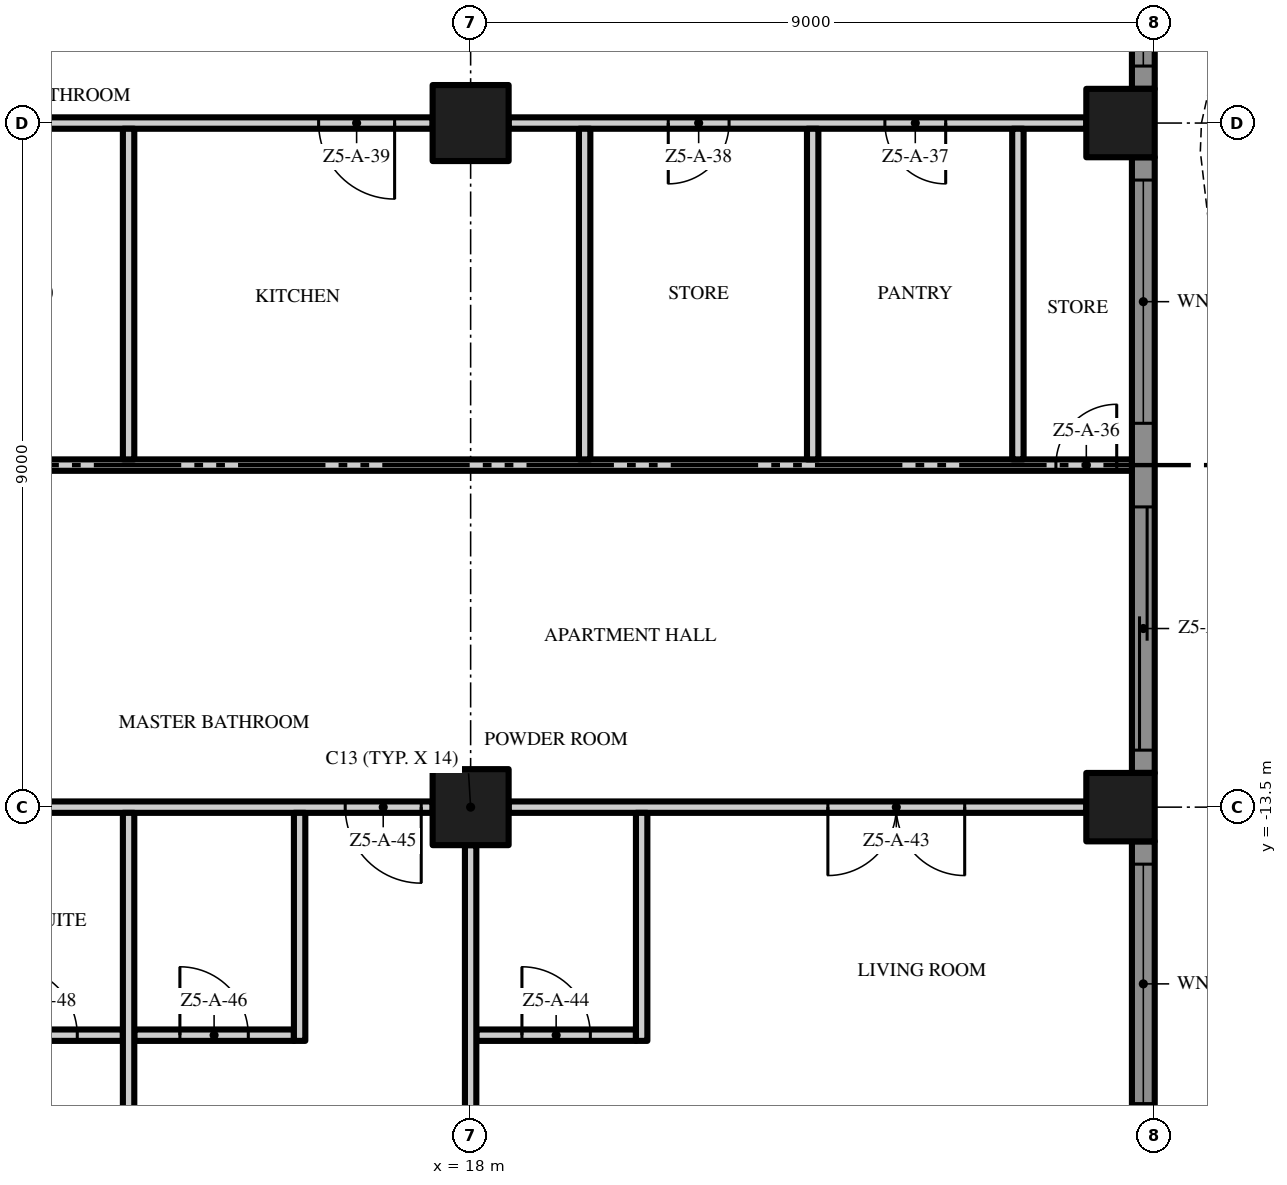
"""IFC4 building model, lengths in metres.
Left out: names, types, materials, properties, quantities, classifications, styles, units other than length and angle.
Written with IfcOpenShell. Run it as: python <this file> out.ifc"""

import sys

from ifc_helpers import new_model, si_unit, direction, frame, frame_2d, origin, origin_2d, place, context, subcontext, project, spatial, polyline, rectangle, outline, extrude, element, fill, save


model = new_model("IFC4")
c1 = context("Model", 3, precision=1e-05, world=origin(), true_north=direction((0.0, 1.0)))
c2 = subcontext(c1, "Body", "Model", "MODEL_VIEW")
j1 = project(units=[si_unit("LENGTHUNIT", "METRE"), si_unit("PLANEANGLEUNIT", "RADIAN")], contexts=[c1])
p1 = place(None, origin())
s1 = spatial("IfcSite", under=j1, at=p1, CompositionType="ELEMENT")
p2 = place(p1, origin())
s2 = spatial("IfcBuilding", under=s1, at=p2, CompositionType="ELEMENT")
p3 = place(p2, frame((0.0, 0.0, 238.8)))
s3 = spatial("IfcBuildingStorey", under=s2, at=p3, CompositionType="ELEMENT", Elevation=238.8)
for number, where, z_axis, x_axis in (
    (1, (18.0, -13.5, 0.0), (0.0, 0.0, 1.0), (1.0, 0.0, 0.0)),
    (2, (18.0, -4.5, 0.0), (0.0, 0.0, 1.0), (1.0, 0.0, 0.0)),
):
    element("IfcColumn", number, at=place(p3, frame(where, z_axis=z_axis, x_axis=x_axis)), inside=s3, PredefinedType="COLUMN", context=c2, shape_type="SweptSolid", body=[
        extrude(rectangle(XDim=1.0, YDim=1.0, at=origin_2d()), origin(), (0.0, 0.0, 1.0), 3.5),
    ])
for number, where, z_axis, x_axis in (
    (3, (26.55, -13.5, 0.0), (0.0, 0.0, 1.0), (1.0, 0.0, 0.0)),
    (4, (26.55, -4.5, 0.0), (0.0, 0.0, 1.0), (1.0, 0.0, 0.0)),
):
    element("IfcColumn", number, at=place(p3, frame(where, z_axis=z_axis, x_axis=x_axis)), inside=s3, PredefinedType="COLUMN", context=c2, shape_type="SweptSolid", body=[
        extrude(rectangle(XDim=0.9, YDim=0.9, at=origin_2d()), origin(), (0.0, 0.0, 1.0), 3.5),
    ])
p4 = place(p3, frame((26.85, -13.95, 0.0), z_axis=(0.0, 0.0, 1.0), x_axis=(0.0, -1.0, 0.0)))
e5 = element("IfcWall", 5, at=p4, inside=s3, PredefinedType="SOLIDWALL", context=c2, shape_type="SweptSolid", body=[
    extrude(rectangle(XDim=3.75, YDim=0.3, at=frame_2d((1.875, 0.0))), origin(), (0.0, 0.0, 1.0), 3.5),
])
p5 = place(p4, frame((0.3, 0.0, 0.45)))
e6 = element("IfcOpeningElement", 6, at=p5, cuts=e5, PredefinedType="OPENING", context=c2, shape_type="SweptSolid", body=[
    extrude(rectangle(XDim=3.15, YDim=2.65, at=frame_2d((1.575, 1.325))), frame((0.0, 0.16, 0.0), z_axis=(0.0, -1.0, 0.0), x_axis=(1.0, 0.0, 0.0)), (0.0, 0.0, 1.0), 0.32),
])
p6 = place(p3, frame((26.85, -4.95, 0.0), z_axis=(0.0, 0.0, 1.0), x_axis=(0.0, -1.0, 0.0)))
e7 = element("IfcWall", 7, at=p6, inside=s3, PredefinedType="SOLIDWALL", context=c2, shape_type="SweptSolid", body=[
    extrude(rectangle(XDim=8.1, YDim=0.3, at=frame_2d((4.05, 0.0))), origin(), (0.0, 0.0, 1.0), 3.5),
])
p7 = place(p6, frame((4.6, 0.0, 0.0)))
e8 = element("IfcOpeningElement", 8, at=p7, cuts=e7, PredefinedType="OPENING", context=c2, shape_type="SweptSolid", body=[
    extrude(rectangle(XDim=3.2, YDim=2.4, at=frame_2d((1.6, 1.2))), frame((0.0, 0.16, 0.0), z_axis=(0.0, -1.0, 0.0), x_axis=(1.0, 0.0, 0.0)), (0.0, 0.0, 1.0), 0.32),
])
p8 = place(p6, frame((0.3, 0.0, 0.45)))
e9 = element("IfcOpeningElement", 9, at=p8, cuts=e7, PredefinedType="OPENING", context=c2, shape_type="SweptSolid", body=[
    extrude(rectangle(XDim=3.2, YDim=2.65, at=frame_2d((1.6, 1.325))), frame((0.0, 0.16, 0.0), z_axis=(0.0, -1.0, 0.0), x_axis=(1.0, 0.0, 0.0)), (0.0, 0.0, 1.0), 0.32),
])
p9 = place(p3, frame((26.85, 4.05, 0.0), z_axis=(0.0, 0.0, 1.0), x_axis=(0.0, -1.0, 0.0)))
e10 = element("IfcWall", 10, at=p9, inside=s3, PredefinedType="SOLIDWALL", context=c2, shape_type="SweptSolid", body=[
    extrude(rectangle(XDim=8.1, YDim=0.3, at=frame_2d((4.05, 0.0))), origin(), (0.0, 0.0, 1.0), 3.5),
])
p10 = place(p9, frame((4.6, 0.0, 0.45)))
e11 = element("IfcOpeningElement", 11, at=p10, cuts=e10, PredefinedType="OPENING", context=c2, shape_type="SweptSolid", body=[
    extrude(rectangle(XDim=3.2, YDim=2.65, at=frame_2d((1.6, 1.325))), frame((0.0, 0.16, 0.0), z_axis=(0.0, -1.0, 0.0), x_axis=(1.0, 0.0, 0.0)), (0.0, 0.0, 1.0), 0.32),
])
p11 = place(p9, frame((0.3, 0.0, 0.0)))
e12 = element("IfcOpeningElement", 12, at=p11, cuts=e10, PredefinedType="OPENING", context=c2, shape_type="SweptSolid", body=[
    extrude(rectangle(XDim=3.2, YDim=2.4, at=frame_2d((1.6, 1.2))), frame((0.0, 0.16, 0.0), z_axis=(0.0, -1.0, 0.0), x_axis=(1.0, 0.0, 0.0)), (0.0, 0.0, 1.0), 0.32),
])
p12 = place(p3, origin())
e13 = element("IfcWall", 13, at=p12, inside=s3, PredefinedType="USERDEFINED", context=c2, shape_type="SweptSolid", body=[
    extrude(outline(polyline([(27.951, -18.0), (28.612, -16.5), (29.345, -15.0), (29.869, -13.5), (30.0, -12.375), (29.985, -12.0), (29.649, -10.5), (28.988, -9.0), (28.255, -7.5), (27.731, -6.0), (27.6, -4.875), (27.615, -4.5), (27.951, -3.0), (28.612, -1.5), (29.345, 0.0), (29.869, 1.5), (30.0, 2.625), (29.985, 3.0), (29.649, 4.5), (28.988, 6.0), (28.255, 7.5), (27.731, 9.0), (27.6, 10.125), (27.615, 10.5), (27.951, 12.0), (28.612, 13.5), (29.345, 15.0), (29.869, 16.5), (30.0, 17.625), (29.985, 18.0), (29.735, 17.99), (29.749, 17.635), (29.624, 16.556), (29.114, 15.096), (28.385, 13.605), (27.713, 12.079), (27.366, 10.533), (27.349, 10.115), (27.486, 8.944), (28.024, 7.404), (28.761, 5.895), (29.41, 4.421), (29.736, 2.967), (29.749, 2.635), (29.624, 1.556), (29.114, 0.096), (28.385, -1.395), (27.713, -2.921), (27.366, -4.467), (27.349, -4.885), (27.486, -6.056), (28.024, -7.596), (28.761, -9.105), (29.41, -10.579), (29.736, -12.033), (29.749, -12.365), (29.624, -13.444), (29.114, -14.904), (28.385, -16.395), (27.723, -17.899), (27.951, -18.0)])), origin(), (0.0, 0.0, 1.0), 0.9),
])
p13 = place(p3, frame((11.325, -16.5, 0.0), z_axis=(0.0, 0.0, 1.0), x_axis=(1.0, 0.0, 0.0)))
e14 = element("IfcWall", 14, at=p13, inside=s3, PredefinedType="PARTITIONING", context=c2, shape_type="SweptSolid", body=[
    extrude(rectangle(XDim=2.1, YDim=0.15, at=frame_2d((1.05, 0.0))), origin(), (0.0, 0.0, 1.0), 3.5),
])
p14 = place(p13, frame((0.6, 0.0, 0.0)))
e15 = element("IfcOpeningElement", 15, at=p14, cuts=e14, PredefinedType="OPENING", context=c2, shape_type="SweptSolid", body=[
    extrude(rectangle(XDim=0.9, YDim=2.1, at=frame_2d((0.45, 1.05))), frame((0.0, 0.085, 0.0), z_axis=(0.0, -1.0, 0.0), x_axis=(1.0, 0.0, 0.0)), (0.0, 0.0, 1.0), 0.17),
])
p15 = place(p3, frame((13.575, -16.5, 0.0), z_axis=(0.0, 0.0, 1.0), x_axis=(1.0, 0.0, 0.0)))
e16 = element("IfcWall", 16, at=p15, inside=s3, PredefinedType="PARTITIONING", context=c2, shape_type="SweptSolid", body=[
    extrude(rectangle(XDim=2.1, YDim=0.15, at=frame_2d((1.05, 0.0))), origin(), (0.0, 0.0, 1.0), 3.5),
])
p16 = place(p15, frame((0.6, 0.0, 0.0)))
e17 = element("IfcOpeningElement", 17, at=p16, cuts=e16, PredefinedType="OPENING", context=c2, shape_type="SweptSolid", body=[
    extrude(rectangle(XDim=0.9, YDim=2.1, at=frame_2d((0.45, 1.05))), frame((0.0, 0.085, 0.0), z_axis=(0.0, -1.0, 0.0), x_axis=(1.0, 0.0, 0.0)), (0.0, 0.0, 1.0), 0.17),
])
p17 = place(p3, frame((18.075, -16.5, 0.0), z_axis=(0.0, 0.0, 1.0), x_axis=(1.0, 0.0, 0.0)))
e18 = element("IfcWall", 18, at=p17, inside=s3, PredefinedType="PARTITIONING", context=c2, shape_type="SweptSolid", body=[
    extrude(rectangle(XDim=2.1, YDim=0.15, at=frame_2d((1.05, 0.0))), origin(), (0.0, 0.0, 1.0), 3.5),
])
p18 = place(p17, frame((0.6, 0.0, 0.0)))
e19 = element("IfcOpeningElement", 19, at=p18, cuts=e18, PredefinedType="OPENING", context=c2, shape_type="SweptSolid", body=[
    extrude(rectangle(XDim=0.9, YDim=2.1, at=frame_2d((0.45, 1.05))), frame((0.0, 0.085, 0.0), z_axis=(0.0, -1.0, 0.0), x_axis=(1.0, 0.0, 0.0)), (0.0, 0.0, 1.0), 0.17),
])
p19 = place(p3, frame((17.5, -13.5, 0.0), z_axis=(0.0, 0.0, 1.0), x_axis=(-1.0, 0.0, 0.0)))
e20 = element("IfcWall", 20, at=p19, inside=s3, PredefinedType="PARTITIONING", context=c2, shape_type="SweptSolid", body=[
    extrude(rectangle(XDim=8.0, YDim=0.15, at=frame_2d((4.0, 0.0))), origin(), (0.0, 0.0, 1.0), 3.5),
])
p20 = place(p19, frame((0.15, 0.0, 0.0)))
e21 = element("IfcOpeningElement", 21, at=p20, cuts=e20, PredefinedType="OPENING", context=c2, shape_type="SweptSolid", body=[
    extrude(rectangle(XDim=1.0, YDim=2.4, at=frame_2d((0.5, 1.2))), frame((0.0, 0.085, 0.0), z_axis=(0.0, -1.0, 0.0), x_axis=(1.0, 0.0, 0.0)), (0.0, 0.0, 1.0), 0.17),
])
p21 = place(p19, frame((6.85, 0.0, 0.0)))
e22 = element("IfcOpeningElement", 22, at=p21, cuts=e20, PredefinedType="OPENING", context=c2, shape_type="SweptSolid", body=[
    extrude(rectangle(XDim=1.0, YDim=2.4, at=frame_2d((0.5, 1.2))), frame((0.0, 0.085, 0.0), z_axis=(0.0, -1.0, 0.0), x_axis=(1.0, 0.0, 0.0)), (0.0, 0.0, 1.0), 0.17),
])
p22 = place(p3, frame((26.1, -13.5, 0.0), z_axis=(0.0, 0.0, 1.0), x_axis=(-1.0, 0.0, 0.0)))
e23 = element("IfcWall", 23, at=p22, inside=s3, PredefinedType="PARTITIONING", context=c2, shape_type="SweptSolid", body=[
    extrude(rectangle(XDim=7.6, YDim=0.15, at=frame_2d((3.8, 0.0))), origin(), (0.0, 0.0, 1.0), 3.5),
])
p23 = place(p22, frame((1.6, 0.0, 0.0)))
e24 = element("IfcOpeningElement", 24, at=p23, cuts=e23, PredefinedType="OPENING", context=c2, shape_type="SweptSolid", body=[
    extrude(rectangle(XDim=1.8, YDim=2.4, at=frame_2d((0.9, 1.2))), frame((0.0, 0.085, 0.0), z_axis=(0.0, -1.0, 0.0), x_axis=(1.0, 0.0, 0.0)), (0.0, 0.0, 1.0), 0.17),
])
p24 = place(p3, frame((11.325, -9.0, 0.0), z_axis=(0.0, 0.0, 1.0), x_axis=(1.0, 0.0, 0.0)))
e25 = element("IfcWall", 25, at=p24, inside=s3, PredefinedType="PARTITIONING", context=c2, shape_type="SweptSolid", body=[
    extrude(rectangle(XDim=15.375, YDim=0.15, at=frame_2d((7.688, 0.0))), origin(), (0.0, 0.0, 1.0), 3.5),
])
p25 = place(p24, frame((14.375, 0.0, 0.0)))
e26 = element("IfcOpeningElement", 26, at=p25, cuts=e25, PredefinedType="OPENING", context=c2, shape_type="SweptSolid", body=[
    extrude(rectangle(XDim=0.8, YDim=2.0, at=frame_2d((0.4, 1.0))), frame((0.0, 0.085, 0.0), z_axis=(0.0, -1.0, 0.0), x_axis=(1.0, 0.0, 0.0)), (0.0, 0.0, 1.0), 0.17),
])
p26 = place(p3, frame((17.5, -4.5, 0.0), z_axis=(0.0, 0.0, 1.0), x_axis=(-1.0, 0.0, 0.0)))
e27 = element("IfcWall", 27, at=p26, inside=s3, PredefinedType="PARTITIONING", context=c2, shape_type="SweptSolid", body=[
    extrude(rectangle(XDim=6.175, YDim=0.15, at=frame_2d((3.087, 0.0))), origin(), (0.0, 0.0, 1.0), 3.5),
])
p27 = place(p26, frame((0.5, 0.0, 0.0)))
e28 = element("IfcOpeningElement", 28, at=p27, cuts=e27, PredefinedType="OPENING", context=c2, shape_type="SweptSolid", body=[
    extrude(rectangle(XDim=1.0, YDim=2.4, at=frame_2d((0.5, 1.2))), frame((0.0, 0.085, 0.0), z_axis=(0.0, -1.0, 0.0), x_axis=(1.0, 0.0, 0.0)), (0.0, 0.0, 1.0), 0.17),
])
p28 = place(p3, frame((26.1, -4.5, 0.0), z_axis=(0.0, 0.0, 1.0), x_axis=(-1.0, 0.0, 0.0)))
e29 = element("IfcWall", 29, at=p28, inside=s3, PredefinedType="PARTITIONING", context=c2, shape_type="SweptSolid", body=[
    extrude(rectangle(XDim=7.6, YDim=0.15, at=frame_2d((3.8, 0.0))), origin(), (0.0, 0.0, 1.0), 3.5),
])
p29 = place(p28, frame((1.85, 0.0, 0.0)))
e30 = element("IfcOpeningElement", 30, at=p29, cuts=e29, PredefinedType="OPENING", context=c2, shape_type="SweptSolid", body=[
    extrude(rectangle(XDim=0.8, YDim=2.0, at=frame_2d((0.4, 1.0))), frame((0.0, 0.085, 0.0), z_axis=(0.0, -1.0, 0.0), x_axis=(1.0, 0.0, 0.0)), (0.0, 0.0, 1.0), 0.17),
])
p30 = place(p28, frame((4.7, 0.0, 0.0)))
e31 = element("IfcOpeningElement", 31, at=p30, cuts=e29, PredefinedType="OPENING", context=c2, shape_type="SweptSolid", body=[
    extrude(rectangle(XDim=0.8, YDim=2.0, at=frame_2d((0.4, 1.0))), frame((0.0, 0.085, 0.0), z_axis=(0.0, -1.0, 0.0), x_axis=(1.0, 0.0, 0.0)), (0.0, 0.0, 1.0), 0.17),
])
p31 = place(p3, frame((13.5, -22.2, 0.0), z_axis=(0.0, 0.0, 1.0), x_axis=(0.0, 1.0, 0.0)))
e32 = element("IfcWall", 32, at=p31, inside=s3, PredefinedType="PARTITIONING", context=c2, shape_type="SweptSolid", body=[
    extrude(rectangle(XDim=8.625, YDim=0.15, at=frame_2d((4.312, 0.0))), origin(), (0.0, 0.0, 1.0), 3.5),
])
p32 = place(p3, frame((13.5, -8.925, 0.0), z_axis=(0.0, 0.0, 1.0), x_axis=(0.0, 1.0, 0.0)))
e33 = element("IfcWall", 33, at=p32, inside=s3, PredefinedType="PARTITIONING", context=c2, shape_type="SweptSolid", body=[
    extrude(rectangle(XDim=4.35, YDim=0.15, at=frame_2d((2.175, 0.0))), origin(), (0.0, 0.0, 1.0), 3.5),
])
p33 = place(p3, frame((15.75, -16.575, 0.0), z_axis=(0.0, 0.0, 1.0), x_axis=(0.0, 1.0, 0.0)))
e34 = element("IfcWall", 34, at=p33, inside=s3, PredefinedType="PARTITIONING", context=c2, shape_type="SweptSolid", body=[
    extrude(rectangle(XDim=3.0, YDim=0.15, at=frame_2d((1.5, 0.0))), origin(), (0.0, 0.0, 1.0), 3.5),
])
p34 = place(p3, frame((18.0, -21.6, 0.0), z_axis=(0.0, 0.0, 1.0), x_axis=(0.0, 1.0, 0.0)))
e35 = element("IfcWall", 35, at=p34, inside=s3, PredefinedType="PARTITIONING", context=c2, shape_type="SweptSolid", body=[
    extrude(rectangle(XDim=7.6, YDim=0.15, at=frame_2d((3.8, 0.0))), origin(), (0.0, 0.0, 1.0), 3.5),
])
p35 = place(p3, frame((19.5, -8.925, 0.0), z_axis=(0.0, 0.0, 1.0), x_axis=(0.0, 1.0, 0.0)))
e36 = element("IfcWall", 36, at=p35, inside=s3, PredefinedType="PARTITIONING", context=c2, shape_type="SweptSolid", body=[
    extrude(rectangle(XDim=4.35, YDim=0.15, at=frame_2d((2.175, 0.0))), origin(), (0.0, 0.0, 1.0), 3.5),
])
p36 = place(p3, frame((20.25, -16.575, 0.0), z_axis=(0.0, 0.0, 1.0), x_axis=(0.0, 1.0, 0.0)))
e37 = element("IfcWall", 37, at=p36, inside=s3, PredefinedType="PARTITIONING", context=c2, shape_type="SweptSolid", body=[
    extrude(rectangle(XDim=3.0, YDim=0.15, at=frame_2d((1.5, 0.0))), origin(), (0.0, 0.0, 1.0), 3.5),
])
for number, where, z_axis, x_axis in (
    (38, (22.5, -8.925, 0.0), (0.0, 0.0, 1.0), (0.0, 1.0, 0.0)),
    (39, (25.2, -8.925, 0.0), (0.0, 0.0, 1.0), (0.0, 1.0, 0.0)),
):
    element("IfcWall", number, at=place(p3, frame(where, z_axis=z_axis, x_axis=x_axis)), inside=s3, PredefinedType="PARTITIONING", context=c2, shape_type="SweptSolid", body=[
        extrude(rectangle(XDim=4.35, YDim=0.15, at=frame_2d((2.175, 0.0))), origin(), (0.0, 0.0, 1.0), 3.5),
    ])
p37 = place(p5, origin())
e40 = element("IfcWindow", 40, at=p37, inside=s3, PartitioningType="SINGLE_PANEL", PredefinedType="WINDOW", context=c2, shape_type="SweptSolid", body=[
    extrude(rectangle(XDim=3.15, YDim=2.65, at=frame_2d((1.575, 1.325))), frame((0.0, 0.03, 0.0), z_axis=(0.0, -1.0, 0.0), x_axis=(1.0, 0.0, 0.0)), (0.0, 0.0, 1.0), 0.06),
])
fill(e6, e40)
p38 = place(p7, origin())
e41 = element("IfcDoor", 41, at=p38, inside=s3, OperationType="SINGLE_SWING_LEFT", PredefinedType="DOOR", context=c2, shape_type="SweptSolid", body=[
    extrude(rectangle(XDim=3.2, YDim=2.4, at=frame_2d((1.6, 1.2))), frame((0.0, 0.025, 0.0), z_axis=(0.0, -1.0, 0.0), x_axis=(1.0, 0.0, 0.0)), (0.0, 0.0, 1.0), 0.05),
])
fill(e8, e41)
p39 = place(p8, origin())
e42 = element("IfcWindow", 42, at=p39, inside=s3, PartitioningType="SINGLE_PANEL", PredefinedType="WINDOW", context=c2, shape_type="SweptSolid", body=[
    extrude(rectangle(XDim=3.2, YDim=2.65, at=frame_2d((1.6, 1.325))), frame((0.0, 0.03, 0.0), z_axis=(0.0, -1.0, 0.0), x_axis=(1.0, 0.0, 0.0)), (0.0, 0.0, 1.0), 0.06),
])
fill(e9, e42)
p40 = place(p10, origin())
e43 = element("IfcWindow", 43, at=p40, inside=s3, PartitioningType="SINGLE_PANEL", PredefinedType="WINDOW", context=c2, shape_type="SweptSolid", body=[
    extrude(rectangle(XDim=3.2, YDim=2.65, at=frame_2d((1.6, 1.325))), frame((0.0, 0.03, 0.0), z_axis=(0.0, -1.0, 0.0), x_axis=(1.0, 0.0, 0.0)), (0.0, 0.0, 1.0), 0.06),
])
fill(e11, e43)
p41 = place(p25, origin())
e44 = element("IfcDoor", 44, at=p41, inside=s3, OperationType="SINGLE_SWING_RIGHT", PredefinedType="DOOR", context=c2, shape_type="SweptSolid", body=[
    extrude(rectangle(XDim=0.8, YDim=2.0, at=frame_2d((0.4, 1.0))), frame((0.0, 0.025, 0.0), z_axis=(0.0, -1.0, 0.0), x_axis=(1.0, 0.0, 0.0)), (0.0, 0.0, 1.0), 0.05),
])
fill(e26, e44)
p42 = place(p29, origin())
e45 = element("IfcDoor", 45, at=p42, inside=s3, OperationType="SINGLE_SWING_LEFT", PredefinedType="DOOR", context=c2, shape_type="SweptSolid", body=[
    extrude(rectangle(XDim=0.8, YDim=2.0, at=frame_2d((0.4, 1.0))), frame((0.0, 0.025, 0.0), z_axis=(0.0, -1.0, 0.0), x_axis=(1.0, 0.0, 0.0)), (0.0, 0.0, 1.0), 0.05),
])
fill(e30, e45)
p43 = place(p30, origin())
e46 = element("IfcDoor", 46, at=p43, inside=s3, OperationType="SINGLE_SWING_RIGHT", PredefinedType="DOOR", context=c2, shape_type="SweptSolid", body=[
    extrude(rectangle(XDim=0.8, YDim=2.0, at=frame_2d((0.4, 1.0))), frame((0.0, 0.025, 0.0), z_axis=(0.0, -1.0, 0.0), x_axis=(1.0, 0.0, 0.0)), (0.0, 0.0, 1.0), 0.05),
])
fill(e31, e46)
p44 = place(p27, origin())
e47 = element("IfcDoor", 47, at=p44, inside=s3, OperationType="SINGLE_SWING_LEFT", PredefinedType="DOOR", context=c2, shape_type="SweptSolid", body=[
    extrude(rectangle(XDim=1.0, YDim=2.4, at=frame_2d((0.5, 1.2))), frame((0.0, 0.025, 0.0), z_axis=(0.0, -1.0, 0.0), x_axis=(1.0, 0.0, 0.0)), (0.0, 0.0, 1.0), 0.05),
])
fill(e28, e47)
p45 = place(p23, origin())
e48 = element("IfcDoor", 48, at=p45, inside=s3, OperationType="DOUBLE_DOOR_SINGLE_SWING", PredefinedType="DOOR", context=c2, shape_type="SweptSolid", body=[
    extrude(rectangle(XDim=1.8, YDim=2.4, at=frame_2d((0.9, 1.2))), frame((0.0, 0.025, 0.0), z_axis=(0.0, -1.0, 0.0), x_axis=(1.0, 0.0, 0.0)), (0.0, 0.0, 1.0), 0.05),
])
fill(e24, e48)
p46 = place(p18, origin())
e49 = element("IfcDoor", 49, at=p46, inside=s3, OperationType="SINGLE_SWING_LEFT", PredefinedType="DOOR", context=c2, shape_type="SweptSolid", body=[
    extrude(rectangle(XDim=0.9, YDim=2.1, at=frame_2d((0.45, 1.05))), frame((0.0, 0.025, 0.0), z_axis=(0.0, -1.0, 0.0), x_axis=(1.0, 0.0, 0.0)), (0.0, 0.0, 1.0), 0.05),
])
fill(e19, e49)
p47 = place(p20, origin())
e50 = element("IfcDoor", 50, at=p47, inside=s3, OperationType="SINGLE_SWING_LEFT", PredefinedType="DOOR", context=c2, shape_type="SweptSolid", body=[
    extrude(rectangle(XDim=1.0, YDim=2.4, at=frame_2d((0.5, 1.2))), frame((0.0, 0.025, 0.0), z_axis=(0.0, -1.0, 0.0), x_axis=(1.0, 0.0, 0.0)), (0.0, 0.0, 1.0), 0.05),
])
fill(e21, e50)
p48 = place(p16, origin())
e51 = element("IfcDoor", 51, at=p48, inside=s3, OperationType="SINGLE_SWING_LEFT", PredefinedType="DOOR", context=c2, shape_type="SweptSolid", body=[
    extrude(rectangle(XDim=0.9, YDim=2.1, at=frame_2d((0.45, 1.05))), frame((0.0, 0.025, 0.0), z_axis=(0.0, -1.0, 0.0), x_axis=(1.0, 0.0, 0.0)), (0.0, 0.0, 1.0), 0.05),
])
fill(e17, e51)
p49 = place(p14, origin())
e52 = element("IfcDoor", 52, at=p49, inside=s3, OperationType="SINGLE_SWING_LEFT", PredefinedType="DOOR", context=c2, shape_type="SweptSolid", body=[
    extrude(rectangle(XDim=0.9, YDim=2.1, at=frame_2d((0.45, 1.05))), frame((0.0, 0.025, 0.0), z_axis=(0.0, -1.0, 0.0), x_axis=(1.0, 0.0, 0.0)), (0.0, 0.0, 1.0), 0.05),
])
fill(e15, e52)
save(model, sys.argv[1])
